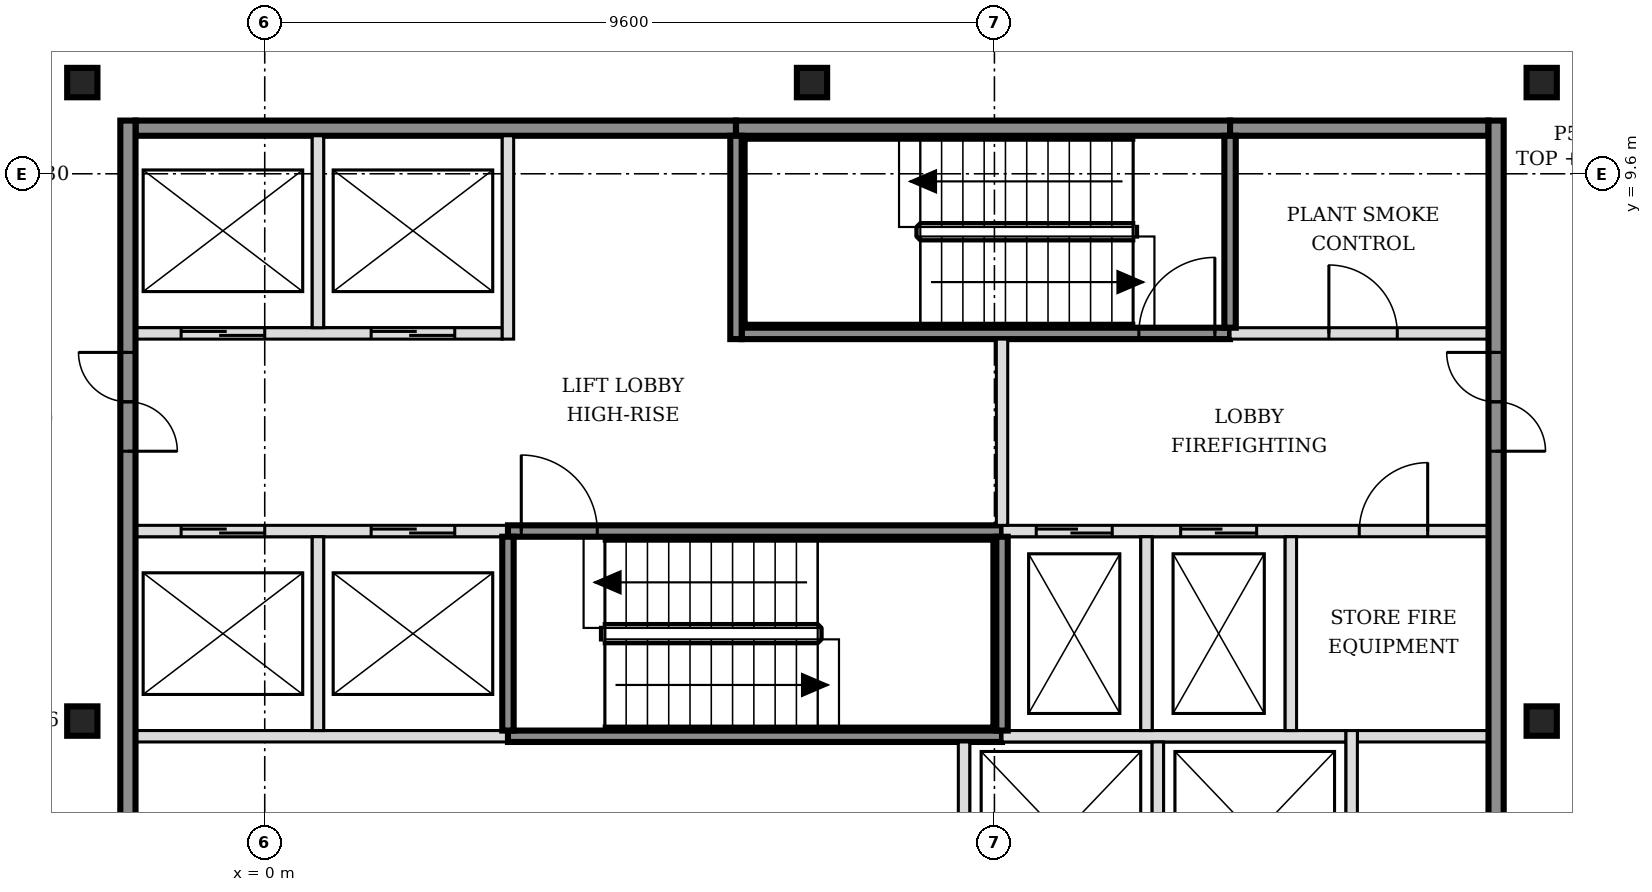
"""IFC4 building model, lengths in metres.
Left out: names, types, materials, properties, quantities, classifications, styles, units other than length and angle.
Written with IfcOpenShell. Run it as: python <this file> out.ifc"""

import sys

from ifc_helpers import new_model, si_unit, direction, frame, frame_2d, origin, origin_2d, place, context, subcontext, project, spatial, rectangle, i_section, extrude, element, fill, save


model = new_model("IFC4")
c1 = context("Model", 3, precision=1e-05, world=origin(), true_north=direction((0.0, 1.0)))
c2 = subcontext(c1, "Body", "Model", "MODEL_VIEW")
j1 = project(units=[si_unit("LENGTHUNIT", "METRE"), si_unit("PLANEANGLEUNIT", "RADIAN")], contexts=[c1])
p1 = place(None, origin())
s1 = spatial("IfcSite", under=j1, at=p1, CompositionType="ELEMENT")
p2 = place(p1, origin())
s2 = spatial("IfcBuilding", under=s1, at=p2, CompositionType="ELEMENT")
p3 = place(p2, frame((0.0, 0.0, 277.8)))
s3 = spatial("IfcBuildingStorey", under=s2, at=p3, CompositionType="ELEMENT", Elevation=277.8)
for number, where, z_axis, x_axis in (
    (1, (-2.4, 2.4, -0.15), (0.0, 0.0, 1.0), (1.0, 0.0, 0.0)),
    (2, (16.8, 2.4, -0.15), (0.0, 0.0, 1.0), (1.0, 0.0, 0.0)),
    (3, (-2.4, 10.8, -0.15), (0.0, 0.0, 1.0), (1.0, 0.0, 0.0)),
    (4, (7.2, 10.8, -0.15), (0.0, 0.0, 1.0), (1.0, 0.0, 0.0)),
    (5, (16.8, 10.8, -0.15), (0.0, 0.0, 1.0), (1.0, 0.0, 0.0)),
):
    element("IfcColumn", number, at=place(p3, frame(where, z_axis=z_axis, x_axis=x_axis)), inside=s3, PredefinedType="COLUMN", context=c2, shape_type="SweptSolid", body=[
        extrude(i_section(OverallWidth=0.398, OverallDepth=0.387, WebThickness=0.021, FlangeThickness=0.033, FilletRadius=0.015, at=origin_2d()), origin(), (0.0, 0.0, 1.0), 3.6),
    ])
p4 = place(p3, frame((-1.7, 2.2, 0.0), z_axis=(0.0, 0.0, 1.0), x_axis=(1.0, 0.0, 0.0)))
e6 = element("IfcWall", 6, at=p4, inside=s3, PredefinedType="SOLIDWALL", context=c2, shape_type="SweptSolid", body=[
    extrude(rectangle(XDim=4.9, YDim=0.15, at=frame_2d((2.45, 0.0))), origin(), (0.0, 0.0, 1.0), 3.45),
])
p5 = place(p3, frame((3.2, 2.2, 0.0), z_axis=(0.0, 0.0, 1.0), x_axis=(1.0, 0.0, 0.0)))
e7 = element("IfcWall", 7, at=p5, inside=s3, PredefinedType="SOLIDWALL", context=c2, shape_type="SweptSolid", body=[
    extrude(rectangle(XDim=6.5, YDim=0.15, at=frame_2d((3.25, 0.0))), origin(), (0.0, 0.0, 1.0), 3.45),
])
p6 = place(p3, frame((9.7, 2.2, 0.0), z_axis=(0.0, 0.0, 1.0), x_axis=(1.0, 0.0, 0.0)))
e8 = element("IfcWall", 8, at=p6, inside=s3, PredefinedType="SOLIDWALL", context=c2, shape_type="SweptSolid", body=[
    extrude(rectangle(XDim=4.525, YDim=0.15, at=frame_2d((2.263, 0.0))), origin(), (0.0, 0.0, 1.0), 3.45),
])
p7 = place(p3, frame((14.375, 2.2, 0.0), z_axis=(0.0, 0.0, 1.0), x_axis=(1.0, 0.0, 0.0)))
e9 = element("IfcWall", 9, at=p7, inside=s3, PredefinedType="PARTITIONING", context=c2, shape_type="SweptSolid", body=[
    extrude(rectangle(XDim=1.725, YDim=0.15, at=frame_2d((0.863, 0.0))), origin(), (0.0, 0.0, 1.0), 3.45),
])
p8 = place(p3, frame((-1.7, 4.9, 0.0), z_axis=(0.0, 0.0, 1.0), x_axis=(1.0, 0.0, 0.0)))
e10 = element("IfcWall", 10, at=p8, inside=s3, PredefinedType="SOLIDWALL", context=c2, shape_type="SweptSolid", body=[
    extrude(rectangle(XDim=4.9, YDim=0.15, at=frame_2d((2.45, 0.0))), origin(), (0.0, 0.0, 1.0), 3.45),
])
p9 = place(p8, frame((0.6, 0.0, 0.0)))
e11 = element("IfcOpeningElement", 11, at=p9, cuts=e10, PredefinedType="OPENING", context=c2, shape_type="SweptSolid", body=[
    extrude(rectangle(XDim=1.1, YDim=2.1, at=frame_2d((0.55, 1.05))), frame((0.0, 0.085, 0.0), z_axis=(0.0, -1.0, 0.0), x_axis=(1.0, 0.0, 0.0)), (0.0, 0.0, 1.0), 0.17),
])
p10 = place(p8, frame((3.1, 0.0, 0.0)))
e12 = element("IfcOpeningElement", 12, at=p10, cuts=e10, PredefinedType="OPENING", context=c2, shape_type="SweptSolid", body=[
    extrude(rectangle(XDim=1.1, YDim=2.1, at=frame_2d((0.55, 1.05))), frame((0.0, 0.085, 0.0), z_axis=(0.0, -1.0, 0.0), x_axis=(1.0, 0.0, 0.0)), (0.0, 0.0, 1.0), 0.17),
])
p11 = place(p3, frame((3.2, 4.9, 0.0), z_axis=(0.0, 0.0, 1.0), x_axis=(1.0, 0.0, 0.0)))
e13 = element("IfcWall", 13, at=p11, inside=s3, PredefinedType="SOLIDWALL", context=c2, shape_type="SweptSolid", body=[
    extrude(rectangle(XDim=6.5, YDim=0.15, at=frame_2d((3.25, 0.0))), origin(), (0.0, 0.0, 1.0), 3.45),
])
p12 = place(p11, frame((0.175, 0.0, 0.0)))
e14 = element("IfcOpeningElement", 14, at=p12, cuts=e13, PredefinedType="OPENING", context=c2, shape_type="SweptSolid", body=[
    extrude(rectangle(XDim=1.0, YDim=2.1, at=frame_2d((0.5, 1.05))), frame((0.0, 0.085, 0.0), z_axis=(0.0, -1.0, 0.0), x_axis=(1.0, 0.0, 0.0)), (0.0, 0.0, 1.0), 0.17),
])
p13 = place(p3, frame((9.7, 4.9, 0.0), z_axis=(0.0, 0.0, 1.0), x_axis=(1.0, 0.0, 0.0)))
e15 = element("IfcWall", 15, at=p13, inside=s3, PredefinedType="SOLIDWALL", context=c2, shape_type="SweptSolid", body=[
    extrude(rectangle(XDim=6.4, YDim=0.15, at=frame_2d((3.2, 0.0))), origin(), (0.0, 0.0, 1.0), 3.45),
])
p14 = place(p13, frame((0.45, 0.0, 0.0)))
e16 = element("IfcOpeningElement", 16, at=p14, cuts=e15, PredefinedType="OPENING", context=c2, shape_type="SweptSolid", body=[
    extrude(rectangle(XDim=1.0, YDim=2.1, at=frame_2d((0.5, 1.05))), frame((0.0, 0.085, 0.0), z_axis=(0.0, -1.0, 0.0), x_axis=(1.0, 0.0, 0.0)), (0.0, 0.0, 1.0), 0.17),
])
p15 = place(p13, frame((2.35, 0.0, 0.0)))
e17 = element("IfcOpeningElement", 17, at=p15, cuts=e15, PredefinedType="OPENING", context=c2, shape_type="SweptSolid", body=[
    extrude(rectangle(XDim=1.0, YDim=2.1, at=frame_2d((0.5, 1.05))), frame((0.0, 0.085, 0.0), z_axis=(0.0, -1.0, 0.0), x_axis=(1.0, 0.0, 0.0)), (0.0, 0.0, 1.0), 0.17),
])
p16 = place(p13, frame((4.7, 0.0, 0.0)))
e18 = element("IfcOpeningElement", 18, at=p16, cuts=e15, PredefinedType="OPENING", context=c2, shape_type="SweptSolid", body=[
    extrude(rectangle(XDim=0.9, YDim=2.1, at=frame_2d((0.45, 1.05))), frame((0.0, 0.085, 0.0), z_axis=(0.0, -1.0, 0.0), x_axis=(1.0, 0.0, 0.0)), (0.0, 0.0, 1.0), 0.17),
])
p17 = place(p3, frame((-1.7, 7.5, 0.0), z_axis=(0.0, 0.0, 1.0), x_axis=(1.0, 0.0, 0.0)))
e19 = element("IfcWall", 19, at=p17, inside=s3, PredefinedType="SOLIDWALL", context=c2, shape_type="SweptSolid", body=[
    extrude(rectangle(XDim=4.825, YDim=0.15, at=frame_2d((2.413, 0.0))), origin(), (0.0, 0.0, 1.0), 3.45),
])
p18 = place(p17, frame((0.6, 0.0, 0.0)))
e20 = element("IfcOpeningElement", 20, at=p18, cuts=e19, PredefinedType="OPENING", context=c2, shape_type="SweptSolid", body=[
    extrude(rectangle(XDim=1.1, YDim=2.1, at=frame_2d((0.55, 1.05))), frame((0.0, 0.085, 0.0), z_axis=(0.0, -1.0, 0.0), x_axis=(1.0, 0.0, 0.0)), (0.0, 0.0, 1.0), 0.17),
])
p19 = place(p17, frame((3.1, 0.0, 0.0)))
e21 = element("IfcOpeningElement", 21, at=p19, cuts=e19, PredefinedType="OPENING", context=c2, shape_type="SweptSolid", body=[
    extrude(rectangle(XDim=1.1, YDim=2.1, at=frame_2d((0.55, 1.05))), frame((0.0, 0.085, 0.0), z_axis=(0.0, -1.0, 0.0), x_axis=(1.0, 0.0, 0.0)), (0.0, 0.0, 1.0), 0.17),
])
p20 = place(p3, frame((6.275, 7.5, 0.0), z_axis=(0.0, 0.0, 1.0), x_axis=(1.0, 0.0, 0.0)))
e22 = element("IfcWall", 22, at=p20, inside=s3, PredefinedType="SOLIDWALL", context=c2, shape_type="SweptSolid", body=[
    extrude(rectangle(XDim=6.425, YDim=0.15, at=frame_2d((3.212, 0.0))), origin(), (0.0, 0.0, 1.0), 3.45),
])
p21 = place(p20, frame((5.225, 0.0, 0.0)))
e23 = element("IfcOpeningElement", 23, at=p21, cuts=e22, PredefinedType="OPENING", context=c2, shape_type="SweptSolid", body=[
    extrude(rectangle(XDim=1.0, YDim=2.1, at=frame_2d((0.5, 1.05))), frame((0.0, 0.085, 0.0), z_axis=(0.0, -1.0, 0.0), x_axis=(1.0, 0.0, 0.0)), (0.0, 0.0, 1.0), 0.17),
])
p22 = place(p3, frame((12.7, 7.5, 0.0), z_axis=(0.0, 0.0, 1.0), x_axis=(1.0, 0.0, 0.0)))
e24 = element("IfcWall", 24, at=p22, inside=s3, PredefinedType="SOLIDWALL", context=c2, shape_type="SweptSolid", body=[
    extrude(rectangle(XDim=3.4, YDim=0.15, at=frame_2d((1.7, 0.0))), origin(), (0.0, 0.0, 1.0), 3.45),
])
p23 = place(p22, frame((1.3, 0.0, 0.0)))
e25 = element("IfcOpeningElement", 25, at=p23, cuts=e24, PredefinedType="OPENING", context=c2, shape_type="SweptSolid", body=[
    extrude(rectangle(XDim=0.9, YDim=2.1, at=frame_2d((0.45, 1.05))), frame((0.0, 0.085, 0.0), z_axis=(0.0, -1.0, 0.0), x_axis=(1.0, 0.0, 0.0)), (0.0, 0.0, 1.0), 0.17),
])
p24 = place(p3, frame((-1.7, 10.2, 0.0), z_axis=(0.0, 0.0, 1.0), x_axis=(1.0, 0.0, 0.0)))
e26 = element("IfcWall", 26, at=p24, inside=s3, PredefinedType="SOLIDWALL", context=c2, shape_type="SweptSolid", body=[
    extrude(rectangle(XDim=7.9, YDim=0.2, at=frame_2d((3.95, 0.0))), origin(), (0.0, 0.0, 1.0), 3.45),
])
p25 = place(p3, frame((6.2, 10.2, 0.0), z_axis=(0.0, 0.0, 1.0), x_axis=(1.0, 0.0, 0.0)))
e27 = element("IfcWall", 27, at=p25, inside=s3, PredefinedType="SOLIDWALL", context=c2, shape_type="SweptSolid", body=[
    extrude(rectangle(XDim=6.5, YDim=0.2, at=frame_2d((3.25, 0.0))), origin(), (0.0, 0.0, 1.0), 3.45),
])
p26 = place(p3, frame((12.7, 10.2, 0.0), z_axis=(0.0, 0.0, 1.0), x_axis=(1.0, 0.0, 0.0)))
e28 = element("IfcWall", 28, at=p26, inside=s3, PredefinedType="SOLIDWALL", context=c2, shape_type="SweptSolid", body=[
    extrude(rectangle(XDim=3.4, YDim=0.2, at=frame_2d((1.7, 0.0))), origin(), (0.0, 0.0, 1.0), 3.45),
])
p27 = place(p3, frame((-1.8, -5.5, 0.0), z_axis=(0.0, 0.0, 1.0), x_axis=(0.0, 1.0, 0.0)))
e29 = element("IfcWall", 29, at=p27, inside=s3, PredefinedType="SOLIDWALL", context=c2, shape_type="SweptSolid", body=[
    extrude(rectangle(XDim=15.8, YDim=0.2, at=frame_2d((7.9, 0.0))), origin(), (0.0, 0.0, 1.0), 3.45),
])
p28 = place(p27, frame((3.05, 0.0, 0.0)))
e30 = element("IfcOpeningElement", 30, at=p28, cuts=e29, PredefinedType="OPENING", context=c2, shape_type="SweptSolid", body=[
    extrude(rectangle(XDim=1.3, YDim=2.1, at=frame_2d((0.65, 1.05))), frame((0.0, 0.11, 0.0), z_axis=(0.0, -1.0, 0.0), x_axis=(1.0, 0.0, 0.0)), (0.0, 0.0, 1.0), 0.22),
])
p29 = place(p27, frame((11.45, 0.0, 0.0)))
e31 = element("IfcOpeningElement", 31, at=p29, cuts=e29, PredefinedType="OPENING", context=c2, shape_type="SweptSolid", body=[
    extrude(rectangle(XDim=1.3, YDim=2.1, at=frame_2d((0.65, 1.05))), frame((0.0, 0.11, 0.0), z_axis=(0.0, -1.0, 0.0), x_axis=(1.0, 0.0, 0.0)), (0.0, 0.0, 1.0), 0.22),
])
p30 = place(p3, frame((0.7, 2.275, 0.0), z_axis=(0.0, 0.0, 1.0), x_axis=(0.0, 1.0, 0.0)))
e32 = element("IfcWall", 32, at=p30, inside=s3, PredefinedType="SOLIDWALL", context=c2, shape_type="SweptSolid", body=[
    extrude(rectangle(XDim=2.55, YDim=0.15, at=frame_2d((1.275, 0.0))), origin(), (0.0, 0.0, 1.0), 3.45),
])
p31 = place(p3, frame((0.7, 7.575, 0.0), z_axis=(0.0, 0.0, 1.0), x_axis=(0.0, 1.0, 0.0)))
e33 = element("IfcWall", 33, at=p31, inside=s3, PredefinedType="SOLIDWALL", context=c2, shape_type="SweptSolid", body=[
    extrude(rectangle(XDim=2.525, YDim=0.15, at=frame_2d((1.263, 0.0))), origin(), (0.0, 0.0, 1.0), 3.45),
])
p32 = place(p3, frame((3.2, 2.275, 0.0), z_axis=(0.0, 0.0, 1.0), x_axis=(0.0, 1.0, 0.0)))
e34 = element("IfcWall", 34, at=p32, inside=s3, PredefinedType="SOLIDWALL", context=c2, shape_type="SweptSolid", body=[
    extrude(rectangle(XDim=2.55, YDim=0.15, at=frame_2d((1.275, 0.0))), origin(), (0.0, 0.0, 1.0), 3.45),
])
for number, where, z_axis, x_axis in (
    (35, (3.2, 7.425, 0.0), (0.0, 0.0, 1.0), (0.0, 1.0, 0.0)),
    (36, (6.2, 7.425, 0.0), (0.0, 0.0, 1.0), (0.0, 1.0, 0.0)),
):
    element("IfcWall", number, at=place(p3, frame(where, z_axis=z_axis, x_axis=x_axis)), inside=s3, PredefinedType="SOLIDWALL", context=c2, shape_type="SweptSolid", body=[
        extrude(rectangle(XDim=2.675, YDim=0.15, at=frame_2d((1.337, 0.0))), origin(), (0.0, 0.0, 1.0), 3.45),
    ])
p33 = place(p3, frame((9.2, -0.475, 0.0), z_axis=(0.0, 0.0, 1.0), x_axis=(0.0, 1.0, 0.0)))
e37 = element("IfcWall", 37, at=p33, inside=s3, PredefinedType="SOLIDWALL", context=c2, shape_type="SweptSolid", body=[
    extrude(rectangle(XDim=2.6, YDim=0.15, at=frame_2d((1.3, 0.0))), origin(), (0.0, 0.0, 1.0), 3.45),
])
p34 = place(p3, frame((9.7, 2.275, 0.0), z_axis=(0.0, 0.0, 1.0), x_axis=(0.0, 1.0, 0.0)))
e38 = element("IfcWall", 38, at=p34, inside=s3, PredefinedType="SOLIDWALL", context=c2, shape_type="SweptSolid", body=[
    extrude(rectangle(XDim=2.55, YDim=0.15, at=frame_2d((1.275, 0.0))), origin(), (0.0, 0.0, 1.0), 3.45),
])
p35 = place(p3, frame((9.7, 4.975, 0.0), z_axis=(0.0, 0.0, 1.0), x_axis=(0.0, 1.0, 0.0)))
e39 = element("IfcWall", 39, at=p35, inside=s3, PredefinedType="SOLIDWALL", context=c2, shape_type="SweptSolid", body=[
    extrude(rectangle(XDim=2.45, YDim=0.15, at=frame_2d((1.225, 0.0))), origin(), (0.0, 0.0, 1.0), 3.45),
])
p36 = place(p3, frame((11.6, 2.275, 0.0), z_axis=(0.0, 0.0, 1.0), x_axis=(0.0, 1.0, 0.0)))
e40 = element("IfcWall", 40, at=p36, inside=s3, PredefinedType="SOLIDWALL", context=c2, shape_type="SweptSolid", body=[
    extrude(rectangle(XDim=2.55, YDim=0.15, at=frame_2d((1.275, 0.0))), origin(), (0.0, 0.0, 1.0), 3.45),
])
p37 = place(p3, frame((11.75, -0.325, 0.0), z_axis=(0.0, 0.0, 1.0), x_axis=(0.0, 1.0, 0.0)))
e41 = element("IfcWall", 41, at=p37, inside=s3, PredefinedType="SOLIDWALL", context=c2, shape_type="SweptSolid", body=[
    extrude(rectangle(XDim=2.45, YDim=0.15, at=frame_2d((1.225, 0.0))), origin(), (0.0, 0.0, 1.0), 3.45),
])
p38 = place(p3, frame((12.7, 7.575, 0.0), z_axis=(0.0, 0.0, 1.0), x_axis=(0.0, 1.0, 0.0)))
e42 = element("IfcWall", 42, at=p38, inside=s3, PredefinedType="SOLIDWALL", context=c2, shape_type="SweptSolid", body=[
    extrude(rectangle(XDim=2.525, YDim=0.15, at=frame_2d((1.263, 0.0))), origin(), (0.0, 0.0, 1.0), 3.45),
])
p39 = place(p3, frame((13.5, 2.275, 0.0), z_axis=(0.0, 0.0, 1.0), x_axis=(0.0, 1.0, 0.0)))
e43 = element("IfcWall", 43, at=p39, inside=s3, PredefinedType="SOLIDWALL", context=c2, shape_type="SweptSolid", body=[
    extrude(rectangle(XDim=2.55, YDim=0.15, at=frame_2d((1.275, 0.0))), origin(), (0.0, 0.0, 1.0), 3.45),
])
p40 = place(p3, frame((14.3, -0.475, 0.0), z_axis=(0.0, 0.0, 1.0), x_axis=(0.0, 1.0, 0.0)))
e44 = element("IfcWall", 44, at=p40, inside=s3, PredefinedType="SOLIDWALL", context=c2, shape_type="SweptSolid", body=[
    extrude(rectangle(XDim=2.75, YDim=0.15, at=frame_2d((1.375, 0.0))), origin(), (0.0, 0.0, 1.0), 3.45),
])
p41 = place(p3, frame((16.2, -5.5, 0.0), z_axis=(0.0, 0.0, 1.0), x_axis=(0.0, 1.0, 0.0)))
e45 = element("IfcWall", 45, at=p41, inside=s3, PredefinedType="SOLIDWALL", context=c2, shape_type="SweptSolid", body=[
    extrude(rectangle(XDim=15.8, YDim=0.2, at=frame_2d((7.9, 0.0))), origin(), (0.0, 0.0, 1.0), 3.45),
])
p42 = place(p41, frame((3.05, 0.0, 0.0)))
e46 = element("IfcOpeningElement", 46, at=p42, cuts=e45, PredefinedType="OPENING", context=c2, shape_type="SweptSolid", body=[
    extrude(rectangle(XDim=1.3, YDim=2.1, at=frame_2d((0.65, 1.05))), frame((0.0, 0.11, 0.0), z_axis=(0.0, -1.0, 0.0), x_axis=(1.0, 0.0, 0.0)), (0.0, 0.0, 1.0), 0.22),
])
p43 = place(p41, frame((11.45, 0.0, 0.0)))
e47 = element("IfcOpeningElement", 47, at=p43, cuts=e45, PredefinedType="OPENING", context=c2, shape_type="SweptSolid", body=[
    extrude(rectangle(XDim=1.3, YDim=2.1, at=frame_2d((0.65, 1.05))), frame((0.0, 0.11, 0.0), z_axis=(0.0, -1.0, 0.0), x_axis=(1.0, 0.0, 0.0)), (0.0, 0.0, 1.0), 0.22),
])
p44 = place(p9, origin())
e48 = element("IfcDoor", 48, at=p44, inside=s3, OperationType="DOUBLE_DOOR_SLIDING", PredefinedType="DOOR", context=c2, shape_type="SweptSolid", body=[
    extrude(rectangle(XDim=1.1, YDim=2.1, at=frame_2d((0.55, 1.05))), frame((0.0, 0.025, 0.0), z_axis=(0.0, -1.0, 0.0), x_axis=(1.0, 0.0, 0.0)), (0.0, 0.0, 1.0), 0.05),
])
fill(e11, e48)
p45 = place(p10, origin())
e49 = element("IfcDoor", 49, at=p45, inside=s3, OperationType="DOUBLE_DOOR_SLIDING", PredefinedType="DOOR", context=c2, shape_type="SweptSolid", body=[
    extrude(rectangle(XDim=1.1, YDim=2.1, at=frame_2d((0.55, 1.05))), frame((0.0, 0.025, 0.0), z_axis=(0.0, -1.0, 0.0), x_axis=(1.0, 0.0, 0.0)), (0.0, 0.0, 1.0), 0.05),
])
fill(e12, e49)
p46 = place(p18, origin())
e50 = element("IfcDoor", 50, at=p46, inside=s3, OperationType="DOUBLE_DOOR_SLIDING", PredefinedType="DOOR", context=c2, shape_type="SweptSolid", body=[
    extrude(rectangle(XDim=1.1, YDim=2.1, at=frame_2d((0.55, 1.05))), frame((0.0, 0.025, 0.0), z_axis=(0.0, -1.0, 0.0), x_axis=(1.0, 0.0, 0.0)), (0.0, 0.0, 1.0), 0.05),
])
fill(e20, e50)
p47 = place(p19, origin())
e51 = element("IfcDoor", 51, at=p47, inside=s3, OperationType="DOUBLE_DOOR_SLIDING", PredefinedType="DOOR", context=c2, shape_type="SweptSolid", body=[
    extrude(rectangle(XDim=1.1, YDim=2.1, at=frame_2d((0.55, 1.05))), frame((0.0, 0.025, 0.0), z_axis=(0.0, -1.0, 0.0), x_axis=(1.0, 0.0, 0.0)), (0.0, 0.0, 1.0), 0.05),
])
fill(e21, e51)
p48 = place(p14, origin())
e52 = element("IfcDoor", 52, at=p48, inside=s3, OperationType="DOUBLE_DOOR_SLIDING", PredefinedType="DOOR", context=c2, shape_type="SweptSolid", body=[
    extrude(rectangle(XDim=1.0, YDim=2.1, at=frame_2d((0.5, 1.05))), frame((0.0, 0.025, 0.0), z_axis=(0.0, -1.0, 0.0), x_axis=(1.0, 0.0, 0.0)), (0.0, 0.0, 1.0), 0.05),
])
fill(e16, e52)
p49 = place(p15, origin())
e53 = element("IfcDoor", 53, at=p49, inside=s3, OperationType="DOUBLE_DOOR_SLIDING", PredefinedType="DOOR", context=c2, shape_type="SweptSolid", body=[
    extrude(rectangle(XDim=1.0, YDim=2.1, at=frame_2d((0.5, 1.05))), frame((0.0, 0.025, 0.0), z_axis=(0.0, -1.0, 0.0), x_axis=(1.0, 0.0, 0.0)), (0.0, 0.0, 1.0), 0.05),
])
fill(e17, e53)
p50 = place(p12, origin())
e54 = element("IfcDoor", 54, at=p50, inside=s3, OperationType="SINGLE_SWING_LEFT", PredefinedType="DOOR", context=c2, shape_type="SweptSolid", body=[
    extrude(rectangle(XDim=1.0, YDim=2.1, at=frame_2d((0.5, 1.05))), frame((0.0, 0.025, 0.0), z_axis=(0.0, -1.0, 0.0), x_axis=(1.0, 0.0, 0.0)), (0.0, 0.0, 1.0), 0.05),
])
fill(e14, e54)
p51 = place(p21, origin())
e55 = element("IfcDoor", 55, at=p51, inside=s3, OperationType="SINGLE_SWING_RIGHT", PredefinedType="DOOR", context=c2, shape_type="SweptSolid", body=[
    extrude(rectangle(XDim=1.0, YDim=2.1, at=frame_2d((0.5, 1.05))), frame((0.0, 0.025, 0.0), z_axis=(0.0, -1.0, 0.0), x_axis=(1.0, 0.0, 0.0)), (0.0, 0.0, 1.0), 0.05),
])
fill(e23, e55)
p52 = place(p29, origin())
e56 = element("IfcDoor", 56, at=p52, inside=s3, OperationType="DOUBLE_DOOR_SINGLE_SWING", PredefinedType="DOOR", context=c2, shape_type="SweptSolid", body=[
    extrude(rectangle(XDim=1.3, YDim=2.1, at=frame_2d((0.65, 1.05))), frame((0.0, 0.025, 0.0), z_axis=(0.0, -1.0, 0.0), x_axis=(1.0, 0.0, 0.0)), (0.0, 0.0, 1.0), 0.05),
])
fill(e31, e56)
p53 = place(p43, origin())
e57 = element("IfcDoor", 57, at=p53, inside=s3, OperationType="DOUBLE_DOOR_SINGLE_SWING", PredefinedType="DOOR", context=c2, shape_type="SweptSolid", body=[
    extrude(rectangle(XDim=1.3, YDim=2.1, at=frame_2d((0.65, 1.05))), frame((0.0, 0.025, 0.0), z_axis=(0.0, -1.0, 0.0), x_axis=(1.0, 0.0, 0.0)), (0.0, 0.0, 1.0), 0.05),
])
fill(e47, e57)
p54 = place(p16, origin())
e58 = element("IfcDoor", 58, at=p54, inside=s3, OperationType="SINGLE_SWING_RIGHT", PredefinedType="DOOR", context=c2, shape_type="SweptSolid", body=[
    extrude(rectangle(XDim=0.9, YDim=2.1, at=frame_2d((0.45, 1.05))), frame((0.0, 0.025, 0.0), z_axis=(0.0, -1.0, 0.0), x_axis=(1.0, 0.0, 0.0)), (0.0, 0.0, 1.0), 0.05),
])
fill(e18, e58)
p55 = place(p23, origin())
e59 = element("IfcDoor", 59, at=p55, inside=s3, OperationType="SINGLE_SWING_LEFT", PredefinedType="DOOR", context=c2, shape_type="SweptSolid", body=[
    extrude(rectangle(XDim=0.9, YDim=2.1, at=frame_2d((0.45, 1.05))), frame((0.0, 0.025, 0.0), z_axis=(0.0, -1.0, 0.0), x_axis=(1.0, 0.0, 0.0)), (0.0, 0.0, 1.0), 0.05),
])
fill(e25, e59)
save(model, sys.argv[1])
